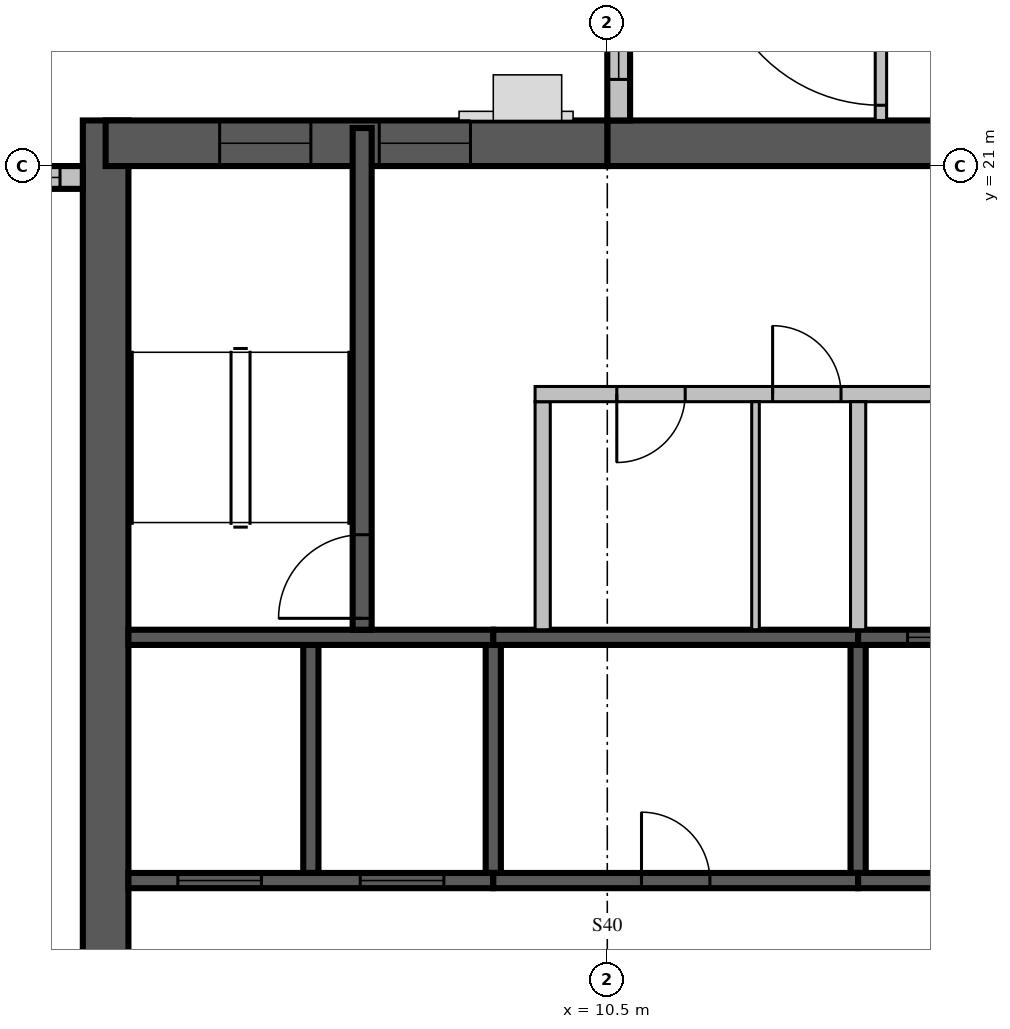
"""IFC4 building model, lengths in metres.
Left out: names, types, materials, properties, quantities, classifications, styles, units other than length and angle.
Written with IfcOpenShell. Run it as: python <this file> out.ifc"""

import sys

from ifc_helpers import new_model, si_unit, direction, frame, frame_2d, origin, place, context, subcontext, project, spatial, rectangle, extrude, source, transform, mapped, element, fill, save


model = new_model("IFC4")
c1 = context("Model", 3, precision=1e-05, world=origin(), true_north=direction((0.0, 1.0)))
c2 = subcontext(c1, "Body", "Model", "MODEL_VIEW")
j1 = project(units=[si_unit("LENGTHUNIT", "METRE"), si_unit("PLANEANGLEUNIT", "RADIAN")], contexts=[c1])
p1 = place(None, origin())
s1 = spatial("IfcSite", under=j1, at=p1, CompositionType="ELEMENT")
p2 = place(p1, origin())
s2 = spatial("IfcBuilding", under=s1, at=p2, CompositionType="ELEMENT")
p3 = place(p2, frame((0.0, 0.0, 326.5)))
s3 = spatial("IfcBuildingStorey", under=s2, at=p3, CompositionType="ELEMENT", Elevation=326.5)
m1 = source(origin(), c2, "Body", "SweptSolid", [
    extrude(rectangle(XDim=17.4, YDim=0.6, at=frame_2d((8.7, 0.0))), origin(), (0.0, 0.0, 1.0), 3.5),
])
p4 = place(p3, frame((3.9, 4.2, 0.0), z_axis=(0.0, 0.0, 1.0), x_axis=(0.0, 1.0, 0.0)))
e1 = element("IfcWall", 1, at=p4, inside=s3, PredefinedType="SHEAR", context=c2, shape_type="MappedRepresentation", body=[
    mapped(m1, transform((0.0, 0.0, 0.0), scale=1.0)),
])
m2 = source(origin(), c2, "Body", "SweptSolid", [
    extrude(rectangle(XDim=2.2, YDim=2.1, at=frame_2d((1.1, 1.05))), frame((0.0, 0.31, 0.0), z_axis=(0.0, -1.0, 0.0), x_axis=(1.0, 0.0, 0.0)), (0.0, 0.0, 1.0), 0.62),
])
p5 = place(p4, frame((4.2, 0.0, 0.0)))
e2 = element("IfcOpeningElement", 2, at=p5, cuts=e1, PredefinedType="OPENING", context=c2, shape_type="MappedRepresentation", body=[
    mapped(m2, transform((0.0, 0.0, 0.0), scale=1.0)),
])
m3 = source(origin(), c2, "Body", "SweptSolid", [
    extrude(rectangle(XDim=11.1, YDim=0.6, at=frame_2d((5.55, 0.0))), origin(), (0.0, 0.0, 1.0), 3.5),
])
p6 = place(p3, frame((10.5, 21.3, 0.0), z_axis=(0.0, 0.0, 1.0), x_axis=(1.0, 0.0, 0.0)))
e3 = element("IfcWall", 3, at=p6, inside=s3, PredefinedType="SHEAR", context=c2, shape_type="MappedRepresentation", body=[
    mapped(m3, transform((0.0, 0.0, 0.0), scale=1.0)),
])
m4 = source(origin(), c2, "Body", "SweptSolid", [
    extrude(rectangle(XDim=1.2, YDim=2.1, at=frame_2d((0.6, 1.05))), frame((0.0, 0.31, 0.0), z_axis=(0.0, -1.0, 0.0), x_axis=(1.0, 0.0, 0.0)), (0.0, 0.0, 1.0), 0.62),
])
p7 = place(p6, frame((8.7, 0.0, 0.0)))
e4 = element("IfcOpeningElement", 4, at=p7, cuts=e3, PredefinedType="OPENING", context=c2, shape_type="MappedRepresentation", body=[
    mapped(m4, transform((0.0, 0.0, 0.0), scale=1.0)),
])
m5 = source(origin(), c2, "Body", "SweptSolid", [
    extrude(rectangle(XDim=6.6, YDim=0.6, at=frame_2d((3.3, 0.0))), origin(), (0.0, 0.0, 1.0), 3.5),
])
p8 = place(p3, frame((3.9, 21.3, 0.0), z_axis=(0.0, 0.0, 1.0), x_axis=(1.0, 0.0, 0.0)))
e5 = element("IfcWall", 5, at=p8, inside=s3, PredefinedType="SHEAR", context=c2, shape_type="MappedRepresentation", body=[
    mapped(m5, transform((0.0, 0.0, 0.0), scale=1.0)),
])
m6 = source(origin(), c2, "Body", "SweptSolid", [
    extrude(rectangle(XDim=1.2, YDim=2.4, at=frame_2d((0.6, 1.2))), frame((0.0, 0.31, 0.0), z_axis=(0.0, -1.0, 0.0), x_axis=(1.0, 0.0, 0.0)), (0.0, 0.0, 1.0), 0.62),
])
p9 = place(p8, frame((1.5, 0.0, 0.6)))
e6 = element("IfcOpeningElement", 6, at=p9, cuts=e5, PredefinedType="OPENING", context=c2, shape_type="MappedRepresentation", body=[
    mapped(m6, transform((0.0, 0.0, 0.0), scale=1.0)),
])
p10 = place(p8, frame((3.6, 0.0, 0.6)))
e7 = element("IfcOpeningElement", 7, at=p10, cuts=e5, PredefinedType="OPENING", context=c2, shape_type="MappedRepresentation", body=[
    mapped(m6, transform((0.0, 0.0, 0.0), scale=1.0)),
])
m7 = source(origin(), c2, "Body", "SweptSolid", [
    extrude(rectangle(XDim=7.5, YDim=0.3, at=frame_2d((3.75, 0.0))), origin(), (0.0, 0.0, 1.0), 3.1),
])
p11 = place(p3, frame((10.65, 29.1, 0.0), z_axis=(0.0, 0.0, 1.0), x_axis=(0.0, -1.0, 0.0)))
e8 = element("IfcWall", 8, at=p11, inside=s3, PredefinedType="STANDARD", context=c2, shape_type="MappedRepresentation", body=[
    mapped(m7, transform((0.0, 0.0, 0.0), scale=1.0)),
])
m8 = source(origin(), c2, "Body", "SweptSolid", [
    extrude(rectangle(XDim=3.6, YDim=2.0, at=frame_2d((1.8, 1.0))), frame((0.0, 0.16, 0.0), z_axis=(0.0, -1.0, 0.0), x_axis=(1.0, 0.0, 0.0)), (0.0, 0.0, 1.0), 0.32),
])
p12 = place(p11, frame((3.36, 0.0, 0.6)))
e9 = element("IfcOpeningElement", 9, at=p12, cuts=e8, PredefinedType="OPENING", context=c2, shape_type="MappedRepresentation", body=[
    mapped(m8, transform((0.0, 0.0, 0.0), scale=1.0)),
])
m9 = source(origin(), c2, "Body", "SweptSolid", [
    extrude(rectangle(XDim=2.4, YDim=2.0, at=frame_2d((1.2, 1.0))), frame((0.0, 0.16, 0.0), z_axis=(0.0, -1.0, 0.0), x_axis=(1.0, 0.0, 0.0)), (0.0, 0.0, 1.0), 0.32),
])
p13 = place(p11, frame((0.48, 0.0, 0.6)))
e10 = element("IfcOpeningElement", 10, at=p13, cuts=e8, PredefinedType="OPENING", context=c2, shape_type="MappedRepresentation", body=[
    mapped(m9, transform((0.0, 0.0, 0.0), scale=1.0)),
])
p14 = place(p3, frame((3.6, 20.85, 0.0), z_axis=(0.0, 0.0, 1.0), x_axis=(-1.0, 0.0, 0.0)))
e11 = element("IfcWall", 11, at=p14, inside=s3, PredefinedType="STANDARD", context=c2, shape_type="SweptSolid", body=[
    extrude(rectangle(XDim=3.0, YDim=0.3, at=frame_2d((1.5, 0.0))), origin(), (0.0, 0.0, 1.0), 3.1),
])
p15 = place(p14, frame((0.3, 0.0, 0.6)))
e12 = element("IfcOpeningElement", 12, at=p15, cuts=e11, PredefinedType="OPENING", context=c2, shape_type="MappedRepresentation", body=[
    mapped(m9, transform((0.0, 0.0, 0.0), scale=1.0)),
])
m10 = source(origin(), c2, "Body", "SweptSolid", [
    extrude(rectangle(XDim=3.0, YDim=0.2, at=frame_2d((1.5, 0.0))), origin(), (0.0, 0.0, 1.0), 3.5),
])
p16 = place(p3, frame((6.6, 11.7, 0.0), z_axis=(0.0, 0.0, 1.0), x_axis=(0.0, 1.0, 0.0)))
e13 = element("IfcWall", 13, at=p16, inside=s3, PredefinedType="SOLIDWALL", context=c2, shape_type="MappedRepresentation", body=[
    mapped(m10, transform((0.0, 0.0, 0.0), scale=1.0)),
])
m11 = source(origin(), c2, "Body", "SweptSolid", [
    extrude(rectangle(XDim=3.0, YDim=0.2, at=frame_2d((1.5, 0.0))), origin(), (0.0, 0.0, 1.0), 3.1),
])
for number, where, z_axis, x_axis in (
    (14, (9.0, 11.7, 0.0), (0.0, 0.0, 1.0), (0.0, 1.0, 0.0)),
    (15, (13.8, 11.7, 0.0), (0.0, 0.0, 1.0), (0.0, 1.0, 0.0)),
):
    element("IfcWall", number, at=place(p3, frame(where, z_axis=z_axis, x_axis=x_axis)), inside=s3, PredefinedType="SOLIDWALL", context=c2, shape_type="MappedRepresentation", body=[
        mapped(m11, transform((0.0, 0.0, 0.0), scale=1.0)),
    ])
m12 = source(origin(), c2, "Body", "SweptSolid", [
    extrude(rectangle(XDim=4.8, YDim=0.2, at=frame_2d((2.4, 0.0))), origin(), (0.0, 0.0, 1.0), 3.5),
])
p17 = place(p3, frame((4.2, 11.6, 0.0), z_axis=(0.0, 0.0, 1.0), x_axis=(1.0, 0.0, 0.0)))
e16 = element("IfcWall", 16, at=p17, inside=s3, PredefinedType="SOLIDWALL", context=c2, shape_type="MappedRepresentation", body=[
    mapped(m12, transform((0.0, 0.0, 0.0), scale=1.0)),
])
m13 = source(origin(), c2, "Body", "SweptSolid", [
    extrude(rectangle(XDim=1.1, YDim=2.1, at=frame_2d((0.55, 1.05))), frame((0.0, 0.11, 0.0), z_axis=(0.0, -1.0, 0.0), x_axis=(1.0, 0.0, 0.0)), (0.0, 0.0, 1.0), 0.22),
])
p18 = place(p17, frame((0.65, 0.0, 0.0)))
e17 = element("IfcOpeningElement", 17, at=p18, cuts=e16, PredefinedType="OPENING", context=c2, shape_type="MappedRepresentation", body=[
    mapped(m13, transform((0.0, 0.0, 0.0), scale=1.0)),
])
p19 = place(p17, frame((3.05, 0.0, 0.0)))
e18 = element("IfcOpeningElement", 18, at=p19, cuts=e16, PredefinedType="OPENING", context=c2, shape_type="MappedRepresentation", body=[
    mapped(m13, transform((0.0, 0.0, 0.0), scale=1.0)),
])
m14 = source(origin(), c2, "Body", "SweptSolid", [
    extrude(rectangle(XDim=4.8, YDim=0.2, at=frame_2d((2.4, 0.0))), origin(), (0.0, 0.0, 1.0), 3.1),
])
p20 = place(p3, frame((9.0, 11.6, 0.0), z_axis=(0.0, 0.0, 1.0), x_axis=(1.0, 0.0, 0.0)))
e19 = element("IfcWall", 19, at=p20, inside=s3, PredefinedType="SOLIDWALL", context=c2, shape_type="MappedRepresentation", body=[
    mapped(m14, transform((0.0, 0.0, 0.0), scale=1.0)),
])
m15 = source(origin(), c2, "Body", "SweptSolid", [
    extrude(rectangle(XDim=0.9, YDim=2.1, at=frame_2d((0.45, 1.05))), frame((0.0, 0.11, 0.0), z_axis=(0.0, -1.0, 0.0), x_axis=(1.0, 0.0, 0.0)), (0.0, 0.0, 1.0), 0.22),
])
p21 = place(p20, frame((1.95, 0.0, 0.0)))
e20 = element("IfcOpeningElement", 20, at=p21, cuts=e19, PredefinedType="OPENING", context=c2, shape_type="MappedRepresentation", body=[
    mapped(m15, transform((0.0, 0.0, 0.0), scale=1.0)),
])
m16 = source(origin(), c2, "Body", "SweptSolid", [
    extrude(rectangle(XDim=7.2, YDim=0.2, at=frame_2d((3.6, 0.0))), origin(), (0.0, 0.0, 1.0), 3.5),
])
p22 = place(p3, frame((13.8, 11.6, 0.0), z_axis=(0.0, 0.0, 1.0), x_axis=(1.0, 0.0, 0.0)))
e21 = element("IfcWall", 21, at=p22, inside=s3, PredefinedType="SOLIDWALL", context=c2, shape_type="MappedRepresentation", body=[
    mapped(m16, transform((0.0, 0.0, 0.0), scale=1.0)),
])
p23 = place(p3, frame((4.2, 14.8, 0.0), z_axis=(0.0, 0.0, 1.0), x_axis=(1.0, 0.0, 0.0)))
e22 = element("IfcWall", 22, at=p23, inside=s3, PredefinedType="SOLIDWALL", context=c2, shape_type="MappedRepresentation", body=[
    mapped(m12, transform((0.0, 0.0, 0.0), scale=1.0)),
])
p24 = place(p3, frame((9.0, 14.8, 0.0), z_axis=(0.0, 0.0, 1.0), x_axis=(1.0, 0.0, 0.0)))
e23 = element("IfcWall", 23, at=p24, inside=s3, PredefinedType="SOLIDWALL", context=c2, shape_type="MappedRepresentation", body=[
    mapped(m14, transform((0.0, 0.0, 0.0), scale=1.0)),
])
p25 = place(p3, frame((13.8, 14.8, 0.0), z_axis=(0.0, 0.0, 1.0), x_axis=(1.0, 0.0, 0.0)))
e24 = element("IfcWall", 24, at=p25, inside=s3, PredefinedType="SOLIDWALL", context=c2, shape_type="MappedRepresentation", body=[
    mapped(m16, transform((0.0, 0.0, 0.0), scale=1.0)),
])
p26 = place(p25, frame((0.65, 0.0, 0.0)))
e25 = element("IfcOpeningElement", 25, at=p26, cuts=e24, PredefinedType="OPENING", context=c2, shape_type="MappedRepresentation", body=[
    mapped(m13, transform((0.0, 0.0, 0.0), scale=1.0)),
])
p27 = place(p25, frame((3.05, 0.0, 0.0)))
e26 = element("IfcOpeningElement", 26, at=p27, cuts=e24, PredefinedType="OPENING", context=c2, shape_type="MappedRepresentation", body=[
    mapped(m13, transform((0.0, 0.0, 0.0), scale=1.0)),
])
p28 = place(p25, frame((5.45, 0.0, 0.0)))
e27 = element("IfcOpeningElement", 27, at=p28, cuts=e24, PredefinedType="OPENING", context=c2, shape_type="MappedRepresentation", body=[
    mapped(m13, transform((0.0, 0.0, 0.0), scale=1.0)),
])
m17 = source(origin(), c2, "Body", "SweptSolid", [
    extrude(rectangle(XDim=6.6, YDim=0.25, at=frame_2d((3.3, 0.0))), origin(), (0.0, 0.0, 1.0), 3.1),
])
p29 = place(p3, frame((7.275, 14.9, 0.0), z_axis=(0.0, 0.0, 1.0), x_axis=(0.0, 1.0, 0.0)))
e28 = element("IfcWall", 28, at=p29, inside=s3, PredefinedType="SOLIDWALL", context=c2, shape_type="MappedRepresentation", body=[
    mapped(m17, transform((0.0, 0.0, 0.0), scale=1.0)),
])
m18 = source(origin(), c2, "Body", "SweptSolid", [
    extrude(rectangle(XDim=1.1, YDim=2.1, at=frame_2d((0.55, 1.05))), frame((0.0, 0.135, 0.0), z_axis=(0.0, -1.0, 0.0), x_axis=(1.0, 0.0, 0.0)), (0.0, 0.0, 1.0), 0.27),
])
p30 = place(p29, frame((0.15, 0.0, 0.0)))
e29 = element("IfcOpeningElement", 29, at=p30, cuts=e28, PredefinedType="OPENING", context=c2, shape_type="MappedRepresentation", body=[
    mapped(m18, transform((0.0, 0.0, 0.0), scale=1.0)),
])
m19 = source(origin(), c2, "Body", "SweptSolid", [
    extrude(rectangle(XDim=3.0, YDim=0.2, at=frame_2d((1.5, 0.0))), origin(), (0.0, 0.0, 1.0), 3.1),
])
p31 = place(p3, frame((9.65, 14.9, 0.0), z_axis=(0.0, 0.0, 1.0), x_axis=(0.0, 1.0, 0.0)))
e30 = element("IfcWall", 30, at=p31, inside=s3, PredefinedType="PARTITIONING", context=c2, shape_type="MappedRepresentation", body=[
    mapped(m19, transform((0.0, 0.0, 0.0), scale=1.0)),
])
m20 = source(origin(), c2, "Body", "SweptSolid", [
    extrude(rectangle(XDim=11.45, YDim=0.2, at=frame_2d((5.725, 0.0))), origin(), (0.0, 0.0, 1.0), 3.1),
])
p32 = place(p3, frame((9.55, 18.0, 0.0), z_axis=(0.0, 0.0, 1.0), x_axis=(1.0, 0.0, 0.0)))
e31 = element("IfcWall", 31, at=p32, inside=s3, PredefinedType="PARTITIONING", context=c2, shape_type="MappedRepresentation", body=[
    mapped(m20, transform((0.0, 0.0, 0.0), scale=1.0)),
])
p33 = place(p32, frame((1.075, 0.0, 0.0)))
e32 = element("IfcOpeningElement", 32, at=p33, cuts=e31, PredefinedType="OPENING", context=c2, shape_type="MappedRepresentation", body=[
    mapped(m15, transform((0.0, 0.0, 0.0), scale=1.0)),
])
p34 = place(p32, frame((3.125, 0.0, 0.0)))
e33 = element("IfcOpeningElement", 33, at=p34, cuts=e31, PredefinedType="OPENING", context=c2, shape_type="MappedRepresentation", body=[
    mapped(m15, transform((0.0, 0.0, 0.0), scale=1.0)),
])
p35 = place(p32, frame((7.35, 0.0, 0.0)))
e34 = element("IfcOpeningElement", 34, at=p35, cuts=e31, PredefinedType="OPENING", context=c2, shape_type="MappedRepresentation", body=[
    mapped(m13, transform((0.0, 0.0, 0.0), scale=1.0)),
])
p36 = place(p3, frame((13.8, 14.9, 0.0), z_axis=(0.0, 0.0, 1.0), x_axis=(0.0, 1.0, 0.0)))
e35 = element("IfcWall", 35, at=p36, inside=s3, PredefinedType="PARTITIONING", context=c2, shape_type="MappedRepresentation", body=[
    mapped(m19, transform((0.0, 0.0, 0.0), scale=1.0)),
])
m21 = source(origin(), c2, "Body", "SweptSolid", [
    extrude(rectangle(XDim=3.0, YDim=0.1, at=frame_2d((1.5, 0.0))), origin(), (0.0, 0.0, 1.0), 3.1),
])
p37 = place(p3, frame((12.45, 14.9, 0.0), z_axis=(0.0, 0.0, 1.0), x_axis=(0.0, 1.0, 0.0)))
e36 = element("IfcWall", 36, at=p37, inside=s3, PredefinedType="PARTITIONING", context=c2, shape_type="MappedRepresentation", body=[
    mapped(m21, transform((0.0, 0.0, 0.0), scale=1.0)),
])
m22 = source(origin(), c2, "Body", "SweptSolid", [
    extrude(rectangle(XDim=7.725, YDim=0.15, at=frame_2d((3.862, 0.0))), origin(), (0.0, 0.0, 1.0), 3.1),
])
p38 = place(p3, frame((14.1, 29.325, 0.0), z_axis=(0.0, 0.0, 1.0), x_axis=(0.0, -1.0, 0.0)))
e37 = element("IfcWall", 37, at=p38, inside=s3, PredefinedType="PARTITIONING", context=c2, shape_type="MappedRepresentation", body=[
    mapped(m22, transform((0.0, 0.0, 0.0), scale=1.0)),
])
m23 = source(origin(), c2, "Body", "SweptSolid", [
    extrude(rectangle(XDim=2.2, YDim=2.1, at=frame_2d((1.1, 1.05))), frame((0.0, 0.085, 0.0), z_axis=(0.0, -1.0, 0.0), x_axis=(1.0, 0.0, 0.0)), (0.0, 0.0, 1.0), 0.17),
])
p39 = place(p38, frame((5.325, 0.0, 0.0)))
e38 = element("IfcOpeningElement", 38, at=p39, cuts=e37, PredefinedType="OPENING", context=c2, shape_type="MappedRepresentation", body=[
    mapped(m23, transform((0.0, 0.0, 0.0), scale=1.0)),
])
m24 = source(origin(), c2, "Body", "SweptSolid", [
    extrude(rectangle(XDim=3.6, YDim=2.0, at=frame_2d((1.8, 1.0))), frame((0.0, 0.03, 0.0), z_axis=(0.0, -1.0, 0.0), x_axis=(1.0, 0.0, 0.0)), (0.0, 0.0, 1.0), 0.06),
])
p40 = place(p12, origin())
e39 = element("IfcWindow", 39, at=p40, inside=s3, PartitioningType="SINGLE_PANEL", PredefinedType="WINDOW", context=c2, shape_type="MappedRepresentation", body=[
    mapped(m24, transform((0.0, 0.0, 0.0), scale=1.0)),
])
fill(e9, e39)
m25 = source(origin(), c2, "Body", "SweptSolid", [
    extrude(rectangle(XDim=2.4, YDim=2.0, at=frame_2d((1.2, 1.0))), frame((0.0, 0.03, 0.0), z_axis=(0.0, -1.0, 0.0), x_axis=(1.0, 0.0, 0.0)), (0.0, 0.0, 1.0), 0.06),
])
p41 = place(p15, origin())
e40 = element("IfcWindow", 40, at=p41, inside=s3, PartitioningType="SINGLE_PANEL", PredefinedType="WINDOW", context=c2, shape_type="MappedRepresentation", body=[
    mapped(m25, transform((0.0, 0.0, 0.0), scale=1.0)),
])
fill(e12, e40)
m26 = source(origin(), c2, "Body", "SweptSolid", [
    extrude(rectangle(XDim=1.1, YDim=2.1, at=frame_2d((0.55, 1.05))), frame((0.0, 0.025, 0.0), z_axis=(0.0, -1.0, 0.0), x_axis=(1.0, 0.0, 0.0)), (0.0, 0.0, 1.0), 0.05),
])
p42 = place(p18, origin())
e41 = element("IfcDoor", 41, at=p42, inside=s3, OperationType="SLIDING_TO_LEFT", PredefinedType="DOOR", context=c2, shape_type="MappedRepresentation", body=[
    mapped(m26, transform((0.0, 0.0, 0.0), scale=1.0)),
])
fill(e17, e41)
p43 = place(p19, origin())
e42 = element("IfcDoor", 42, at=p43, inside=s3, OperationType="SLIDING_TO_LEFT", PredefinedType="DOOR", context=c2, shape_type="MappedRepresentation", body=[
    mapped(m26, transform((0.0, 0.0, 0.0), scale=1.0)),
])
fill(e18, e42)
m27 = source(origin(), c2, "Body", "SweptSolid", [
    extrude(rectangle(XDim=0.9, YDim=2.1, at=frame_2d((0.45, 1.05))), frame((0.0, 0.025, 0.0), z_axis=(0.0, -1.0, 0.0), x_axis=(1.0, 0.0, 0.0)), (0.0, 0.0, 1.0), 0.05),
])
p44 = place(p21, origin())
e43 = element("IfcDoor", 43, at=p44, inside=s3, OperationType="SINGLE_SWING_LEFT", PredefinedType="DOOR", context=c2, shape_type="MappedRepresentation", body=[
    mapped(m27, transform((0.0, 0.0, 0.0), scale=1.0)),
])
fill(e20, e43)
p45 = place(p26, origin())
e44 = element("IfcDoor", 44, at=p45, inside=s3, OperationType="SLIDING_TO_LEFT", PredefinedType="DOOR", context=c2, shape_type="MappedRepresentation", body=[
    mapped(m26, transform((0.0, 0.0, 0.0), scale=1.0)),
])
fill(e25, e44)
p46 = place(p30, origin())
e45 = element("IfcDoor", 45, at=p46, inside=s3, OperationType="SINGLE_SWING_LEFT", PredefinedType="DOOR", context=c2, shape_type="MappedRepresentation", body=[
    mapped(m26, transform((0.0, 0.0, 0.0), scale=1.0)),
])
fill(e29, e45)
p47 = place(p33, origin())
e46 = element("IfcDoor", 46, at=p47, inside=s3, OperationType="SINGLE_SWING_RIGHT", PredefinedType="DOOR", context=c2, shape_type="MappedRepresentation", body=[
    mapped(m27, transform((0.0, 0.0, 0.0), scale=1.0)),
])
fill(e32, e46)
p48 = place(p34, origin())
e47 = element("IfcDoor", 47, at=p48, inside=s3, OperationType="SINGLE_SWING_LEFT", PredefinedType="DOOR", context=c2, shape_type="MappedRepresentation", body=[
    mapped(m27, transform((0.0, 0.0, 0.0), scale=1.0)),
])
fill(e33, e47)
m28 = source(origin(), c2, "Body", "SweptSolid", [
    extrude(rectangle(XDim=1.2, YDim=2.4, at=frame_2d((0.6, 1.2))), frame((0.0, 0.03, 0.0), z_axis=(0.0, -1.0, 0.0), x_axis=(1.0, 0.0, 0.0)), (0.0, 0.0, 1.0), 0.06),
])
p49 = place(p9, origin())
e48 = element("IfcWindow", 48, at=p49, inside=s3, PartitioningType="SINGLE_PANEL", PredefinedType="WINDOW", context=c2, shape_type="MappedRepresentation", body=[
    mapped(m28, transform((0.0, 0.0, 0.0), scale=1.0)),
])
fill(e6, e48)
p50 = place(p10, origin())
e49 = element("IfcWindow", 49, at=p50, inside=s3, PartitioningType="SINGLE_PANEL", PredefinedType="WINDOW", context=c2, shape_type="MappedRepresentation", body=[
    mapped(m28, transform((0.0, 0.0, 0.0), scale=1.0)),
])
fill(e7, e49)
m29 = source(origin(), c2, "Body", "SweptSolid", [
    extrude(rectangle(XDim=2.2, YDim=2.1, at=frame_2d((1.1, 1.05))), frame((0.0, 0.025, 0.0), z_axis=(0.0, -1.0, 0.0), x_axis=(1.0, 0.0, 0.0)), (0.0, 0.0, 1.0), 0.05),
])
p51 = place(p39, origin())
e50 = element("IfcDoor", 50, at=p51, inside=s3, OperationType="DOUBLE_DOOR_SINGLE_SWING", PredefinedType="DOOR", context=c2, shape_type="MappedRepresentation", body=[
    mapped(m29, transform((0.0, 0.0, 0.0), scale=1.0)),
])
fill(e38, e50)
save(model, sys.argv[1])
